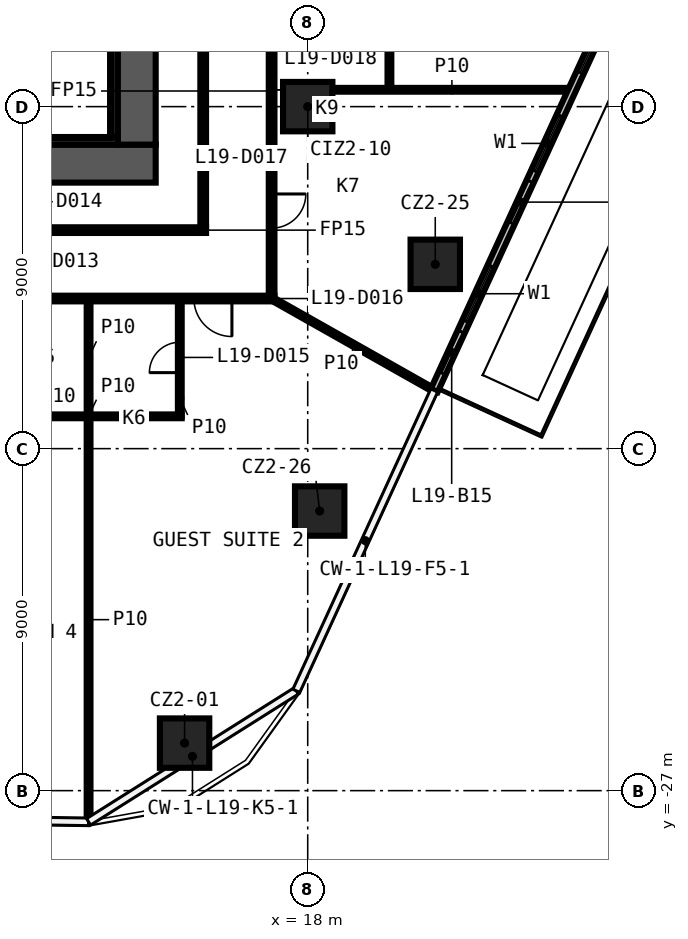
"""IFC4 building model, lengths in metres.
Left out: names, types, materials, properties, quantities, classifications, styles, units other than length and angle.
Written with IfcOpenShell. Run it as: python <this file> out.ifc"""

import sys

from ifc_helpers import new_model, si_unit, direction, frame, frame_2d, origin, origin_2d, place, context, subcontext, project, spatial, rectangle, extrude, element, fill, save


model = new_model("IFC4")
c1 = context("Model", 3, precision=1e-05, world=origin(), true_north=direction((0.0, 1.0)))
c2 = subcontext(c1, "Body", "Model", "MODEL_VIEW")
j1 = project(units=[si_unit("LENGTHUNIT", "METRE"), si_unit("PLANEANGLEUNIT", "RADIAN")], contexts=[c1])
p1 = place(None, origin())
s1 = spatial("IfcSite", under=j1, at=p1, CompositionType="ELEMENT")
p2 = place(p1, origin())
s2 = spatial("IfcBuilding", under=s1, at=p2, CompositionType="ELEMENT")
p3 = place(p2, frame((0.0, 0.0, 95.2)))
s3 = spatial("IfcBuildingStorey", under=s2, at=p3, CompositionType="ELEMENT", Elevation=95.2)
for number, where, z_axis, x_axis in (
    (1, (14.76, -25.749, 0.0), (0.0, 0.0, 1.0), (1.0, 0.0, 0.0)),
    (2, (21.356, -13.15, 0.0), (0.0, 0.0, 1.0), (1.0, 0.0, 0.0)),
    (3, (18.315, -19.642, 0.0), (0.0, 0.0, 1.0), (1.0, 0.0, 0.0)),
    (4, (18.0, -9.0, 0.0), (0.0, 0.0, 1.0), (1.0, 0.0, 0.0)),
):
    element("IfcColumn", number, at=place(p3, frame(where, z_axis=z_axis, x_axis=x_axis)), inside=s3, PredefinedType="COLUMN", context=c2, shape_type="SweptSolid", body=[
        extrude(rectangle(XDim=1.3, YDim=1.3, at=origin_2d()), origin(), (0.0, 0.0, 1.0), 3.25),
    ])
p4 = place(p3, frame((9.784, -17.15, 0.0), z_axis=(0.0, 0.0, 1.0), x_axis=(1.0, 0.0, 0.0)))
e5 = element("IfcWall", 5, at=p4, inside=s3, PredefinedType="PARTITIONING", context=c2, shape_type="SweptSolid", body=[
    extrude(rectangle(XDim=4.9, YDim=0.1, at=frame_2d((2.45, 0.0))), origin(), (0.0, 0.0, 1.0), 3.25),
])
p5 = place(p3, frame((17.125, -14.05, 0.0), z_axis=(0.0, 0.0, 1.0), x_axis=(-1.0, 0.0, 0.0)))
e6 = element("IfcWall", 6, at=p5, inside=s3, PredefinedType="PARTITIONING", context=c2, shape_type="SweptSolid", body=[
    extrude(rectangle(XDim=34.25, YDim=0.15, at=frame_2d((17.125, 0.0))), origin(), (0.0, 0.0, 1.0), 3.25),
])
p6 = place(p5, frame((32.158, 0.0, 0.0)))
e7 = element("IfcOpeningElement", 7, at=p6, cuts=e6, PredefinedType="OPENING", context=c2, shape_type="SweptSolid", body=[
    extrude(rectangle(XDim=0.9, YDim=2.1, at=frame_2d((0.45, 1.05))), frame((0.0, 0.085, 0.0), z_axis=(0.0, -1.0, 0.0), x_axis=(1.0, 0.0, 0.0)), (0.0, 0.0, 1.0), 0.17),
])
p7 = place(p5, frame((27.561, 0.0, 0.0)))
e8 = element("IfcOpeningElement", 8, at=p7, cuts=e6, PredefinedType="OPENING", context=c2, shape_type="SweptSolid", body=[
    extrude(rectangle(XDim=1.0, YDim=2.1, at=frame_2d((0.5, 1.05))), frame((0.0, 0.085, 0.0), z_axis=(0.0, -1.0, 0.0), x_axis=(1.0, 0.0, 0.0)), (0.0, 0.0, 1.0), 0.17),
])
p8 = place(p5, frame((18.64, 0.0, 0.0)))
e9 = element("IfcOpeningElement", 9, at=p8, cuts=e6, PredefinedType="OPENING", context=c2, shape_type="SweptSolid", body=[
    extrude(rectangle(XDim=1.0, YDim=2.1, at=frame_2d((0.5, 1.05))), frame((0.0, 0.085, 0.0), z_axis=(0.0, -1.0, 0.0), x_axis=(1.0, 0.0, 0.0)), (0.0, 0.0, 1.0), 0.17),
])
p9 = place(p5, frame((16.624, 0.0, 0.0)))
e10 = element("IfcOpeningElement", 10, at=p9, cuts=e6, PredefinedType="OPENING", context=c2, shape_type="SweptSolid", body=[
    extrude(rectangle(XDim=1.0, YDim=2.1, at=frame_2d((0.5, 1.05))), frame((0.0, 0.085, 0.0), z_axis=(0.0, -1.0, 0.0), x_axis=(1.0, 0.0, 0.0)), (0.0, 0.0, 1.0), 0.17),
])
p10 = place(p5, frame((9.807, 0.0, 0.0)))
e11 = element("IfcOpeningElement", 11, at=p10, cuts=e6, PredefinedType="OPENING", context=c2, shape_type="SweptSolid", body=[
    extrude(rectangle(XDim=1.0, YDim=2.1, at=frame_2d((0.5, 1.05))), frame((0.0, 0.085, 0.0), z_axis=(0.0, -1.0, 0.0), x_axis=(1.0, 0.0, 0.0)), (0.0, 0.0, 1.0), 0.17),
])
p11 = place(p5, frame((7.795, 0.0, 0.0)))
e12 = element("IfcOpeningElement", 12, at=p11, cuts=e6, PredefinedType="OPENING", context=c2, shape_type="SweptSolid", body=[
    extrude(rectangle(XDim=1.0, YDim=2.1, at=frame_2d((0.5, 1.05))), frame((0.0, 0.085, 0.0), z_axis=(0.0, -1.0, 0.0), x_axis=(1.0, 0.0, 0.0)), (0.0, 0.0, 1.0), 0.17),
])
p12 = place(p5, frame((1.119, 0.0, 0.0)))
e13 = element("IfcOpeningElement", 13, at=p12, cuts=e6, PredefinedType="OPENING", context=c2, shape_type="SweptSolid", body=[
    extrude(rectangle(XDim=1.0, YDim=2.1, at=frame_2d((0.5, 1.05))), frame((0.0, 0.085, 0.0), z_axis=(0.0, -1.0, 0.0), x_axis=(1.0, 0.0, 0.0)), (0.0, 0.0, 1.0), 0.17),
])
p13 = place(p3, frame((8.925, -12.25, 0.0), z_axis=(0.0, 0.0, 1.0), x_axis=(1.0, 0.0, 0.0)))
e14 = element("IfcWall", 14, at=p13, inside=s3, PredefinedType="PARTITIONING", context=c2, shape_type="SweptSolid", body=[
    extrude(rectangle(XDim=6.4, YDim=0.15, at=frame_2d((3.2, 0.0))), origin(), (0.0, 0.0, 1.0), 3.25),
])
p14 = place(p3, frame((18.65, -8.557, 0.0), z_axis=(0.0, 0.0, 1.0), x_axis=(1.0, 0.0, 0.0)))
e15 = element("IfcWall", 15, at=p14, inside=s3, PredefinedType="PARTITIONING", context=c2, shape_type="SweptSolid", body=[
    extrude(rectangle(XDim=6.288, YDim=0.1, at=frame_2d((3.144, 0.0))), origin(), (0.0, 0.0, 1.0), 3.25),
])
p15 = place(p3, frame((20.15, -8.507, 0.0), z_axis=(0.0, 0.0, 1.0), x_axis=(0.0, 1.0, 0.0)))
e16 = element("IfcWall", 16, at=p15, inside=s3, PredefinedType="PARTITIONING", context=c2, shape_type="SweptSolid", body=[
    extrude(rectangle(XDim=2.3, YDim=0.1, at=frame_2d((1.15, 0.0))), origin(), (0.0, 0.0, 1.0), 3.25),
])
p16 = place(p3, frame((17.05, 13.975, 0.0), z_axis=(0.0, 0.0, 1.0), x_axis=(0.0, -1.0, 0.0)))
e17 = element("IfcWall", 17, at=p16, inside=s3, PredefinedType="PARTITIONING", context=c2, shape_type="SweptSolid", body=[
    extrude(rectangle(XDim=27.95, YDim=0.15, at=frame_2d((13.975, 0.0))), origin(), (0.0, 0.0, 1.0), 3.25),
])
p17 = place(p16, frame((25.274, 0.0, 0.0)))
e18 = element("IfcOpeningElement", 18, at=p17, cuts=e17, PredefinedType="OPENING", context=c2, shape_type="SweptSolid", body=[
    extrude(rectangle(XDim=0.9, YDim=2.1, at=frame_2d((0.45, 1.05))), frame((0.0, 0.085, 0.0), z_axis=(0.0, -1.0, 0.0), x_axis=(1.0, 0.0, 0.0)), (0.0, 0.0, 1.0), 0.17),
])
p18 = place(p16, frame((18.854, 0.0, 0.0)))
e19 = element("IfcOpeningElement", 19, at=p18, cuts=e17, PredefinedType="OPENING", context=c2, shape_type="SweptSolid", body=[
    extrude(rectangle(XDim=1.0, YDim=2.1, at=frame_2d((0.5, 1.05))), frame((0.0, 0.085, 0.0), z_axis=(0.0, -1.0, 0.0), x_axis=(1.0, 0.0, 0.0)), (0.0, 0.0, 1.0), 0.17),
])
p19 = place(p16, frame((17.299, 0.0, 0.0)))
e20 = element("IfcOpeningElement", 20, at=p19, cuts=e17, PredefinedType="OPENING", context=c2, shape_type="SweptSolid", body=[
    extrude(rectangle(XDim=1.0, YDim=2.1, at=frame_2d((0.5, 1.05))), frame((0.0, 0.085, 0.0), z_axis=(0.0, -1.0, 0.0), x_axis=(1.0, 0.0, 0.0)), (0.0, 0.0, 1.0), 0.17),
])
p20 = place(p16, frame((11.171, 0.0, 0.0)))
e21 = element("IfcOpeningElement", 21, at=p20, cuts=e17, PredefinedType="OPENING", context=c2, shape_type="SweptSolid", body=[
    extrude(rectangle(XDim=0.9, YDim=2.1, at=frame_2d((0.45, 1.05))), frame((0.0, 0.085, 0.0), z_axis=(0.0, -1.0, 0.0), x_axis=(1.0, 0.0, 0.0)), (0.0, 0.0, 1.0), 0.17),
])
p21 = place(p16, frame((7.243, 0.0, 0.0)))
e22 = element("IfcOpeningElement", 22, at=p21, cuts=e17, PredefinedType="OPENING", context=c2, shape_type="SweptSolid", body=[
    extrude(rectangle(XDim=0.9, YDim=2.1, at=frame_2d((0.45, 1.05))), frame((0.0, 0.085, 0.0), z_axis=(0.0, -1.0, 0.0), x_axis=(1.0, 0.0, 0.0)), (0.0, 0.0, 1.0), 0.17),
])
p22 = place(p16, frame((2.153, 0.0, 0.0)))
e23 = element("IfcOpeningElement", 23, at=p22, cuts=e17, PredefinedType="OPENING", context=c2, shape_type="SweptSolid", body=[
    extrude(rectangle(XDim=0.9, YDim=2.1, at=frame_2d((0.45, 1.05))), frame((0.0, 0.085, 0.0), z_axis=(0.0, -1.0, 0.0), x_axis=(1.0, 0.0, 0.0)), (0.0, 0.0, 1.0), 0.17),
])
p23 = place(p3, frame((15.25, -12.175, 0.0), z_axis=(0.0, 0.0, 1.0), x_axis=(0.0, 1.0, 0.0)))
e24 = element("IfcWall", 24, at=p23, inside=s3, PredefinedType="PARTITIONING", context=c2, shape_type="SweptSolid", body=[
    extrude(rectangle(XDim=24.35, YDim=0.15, at=frame_2d((12.175, 0.0))), origin(), (0.0, 0.0, 1.0), 3.25),
])
p24 = place(p23, frame((11.725, 0.0, 0.0)))
e25 = element("IfcOpeningElement", 25, at=p24, cuts=e24, PredefinedType="OPENING", context=c2, shape_type="SweptSolid", body=[
    extrude(rectangle(XDim=0.9, YDim=2.1, at=frame_2d((0.45, 1.05))), frame((0.0, 0.085, 0.0), z_axis=(0.0, -1.0, 0.0), x_axis=(1.0, 0.0, 0.0)), (0.0, 0.0, 1.0), 0.17),
])
p25 = place(p3, frame((14.634, -17.15, 0.0), z_axis=(0.0, 0.0, 1.0), x_axis=(0.0, 1.0, 0.0)))
e26 = element("IfcWall", 26, at=p25, inside=s3, PredefinedType="PARTITIONING", context=c2, shape_type="SweptSolid", body=[
    extrude(rectangle(XDim=3.025, YDim=0.1, at=frame_2d((1.512, 0.0))), origin(), (0.0, 0.0, 1.0), 3.25),
])
p26 = place(p25, frame((1.15, 0.0, 0.0)))
e27 = element("IfcOpeningElement", 27, at=p26, cuts=e26, PredefinedType="OPENING", context=c2, shape_type="SweptSolid", body=[
    extrude(rectangle(XDim=0.8, YDim=2.1, at=frame_2d((0.4, 1.05))), frame((0.0, 0.06, 0.0), z_axis=(0.0, -1.0, 0.0), x_axis=(1.0, 0.0, 0.0)), (0.0, 0.0, 1.0), 0.12),
])
p27 = place(p3, frame((12.234, -27.801, 0.0), z_axis=(0.0, 0.0, 1.0), x_axis=(0.0, 1.0, 0.0)))
e28 = element("IfcWall", 28, at=p27, inside=s3, PredefinedType="PARTITIONING", context=c2, shape_type="SweptSolid", body=[
    extrude(rectangle(XDim=10.601, YDim=0.1, at=frame_2d((5.3, 0.0))), origin(), (0.0, 0.0, 1.0), 3.25),
])
p28 = place(p3, frame((12.234, -17.1, 0.0), z_axis=(0.0, 0.0, 1.0), x_axis=(0.0, 1.0, 0.0)))
e29 = element("IfcWall", 29, at=p28, inside=s3, PredefinedType="PARTITIONING", context=c2, shape_type="SweptSolid", body=[
    extrude(rectangle(XDim=2.975, YDim=0.1, at=frame_2d((1.488, 0.0))), origin(), (0.0, 0.0, 1.0), 3.25),
])
p29 = place(p3, frame((17.05, -14.05, 0.0), z_axis=(0.0, 0.0, 1.0), x_axis=(0.87059349, -0.492003023537, 0.0)))
e30 = element("IfcWall", 30, at=p29, inside=s3, PredefinedType="PARTITIONING", context=c2, shape_type="SweptSolid", body=[
    extrude(rectangle(XDim=4.895, YDim=0.1, at=frame_2d((2.448, 0.0))), origin(), (0.0, 0.0, 1.0), 3.25),
])
p30 = place(p3, frame((21.329, -16.468, 0.0), z_axis=(0.0, 0.0, 1.0), x_axis=(0.417117833448, 0.908852415423, 0.0)))
e31 = element("IfcWall", 31, at=p30, inside=s3, PredefinedType="SOLIDWALL", context=c2, shape_type="SweptSolid", body=[
    extrude(rectangle(XDim=21.761, YDim=0.2, at=frame_2d((10.881, 0.0))), origin(), (0.0, 0.0, 1.0), 3.25),
])
p31 = place(p30, frame((2.0, 0.0, 0.6)))
e32 = element("IfcOpeningElement", 32, at=p31, cuts=e31, PredefinedType="OPENING", context=c2, shape_type="SweptSolid", body=[
    extrude(rectangle(XDim=1.6, YDim=2.4, at=frame_2d((0.8, 1.2))), frame((0.0, 0.11, 0.0), z_axis=(0.0, -1.0, 0.0), x_axis=(1.0, 0.0, 0.0)), (0.0, 0.0, 1.0), 0.22),
])
p32 = place(p30, frame((0.5, 0.0, 0.0)))
e33 = element("IfcOpeningElement", 33, at=p32, cuts=e31, PredefinedType="OPENING", context=c2, shape_type="SweptSolid", body=[
    extrude(rectangle(XDim=1.2, YDim=2.4, at=frame_2d((0.6, 1.2))), frame((0.0, 0.11, 0.0), z_axis=(0.0, -1.0, 0.0), x_axis=(1.0, 0.0, 0.0)), (0.0, 0.0, 1.0), 0.22),
])
p33 = place(p30, frame((6.352, 0.0, 0.6)))
e34 = element("IfcOpeningElement", 34, at=p33, cuts=e31, PredefinedType="OPENING", context=c2, shape_type="SweptSolid", body=[
    extrude(rectangle(XDim=1.6, YDim=2.4, at=frame_2d((0.8, 1.2))), frame((0.0, 0.11, 0.0), z_axis=(0.0, -1.0, 0.0), x_axis=(1.0, 0.0, 0.0)), (0.0, 0.0, 1.0), 0.22),
])
p34 = place(p30, frame((4.852, 0.0, 0.0)))
e35 = element("IfcOpeningElement", 35, at=p34, cuts=e31, PredefinedType="OPENING", context=c2, shape_type="SweptSolid", body=[
    extrude(rectangle(XDim=1.2, YDim=2.4, at=frame_2d((0.6, 1.2))), frame((0.0, 0.11, 0.0), z_axis=(0.0, -1.0, 0.0), x_axis=(1.0, 0.0, 0.0)), (0.0, 0.0, 1.0), 0.22),
])
p35 = place(p30, frame((9.205, 0.0, 0.6)))
e36 = element("IfcOpeningElement", 36, at=p35, cuts=e31, PredefinedType="OPENING", context=c2, shape_type="SweptSolid", body=[
    extrude(rectangle(XDim=1.6, YDim=2.4, at=frame_2d((0.8, 1.2))), frame((0.0, 0.11, 0.0), z_axis=(0.0, -1.0, 0.0), x_axis=(1.0, 0.0, 0.0)), (0.0, 0.0, 1.0), 0.22),
])
p36 = place(p30, frame((11.205, 0.0, 0.0)))
e37 = element("IfcOpeningElement", 37, at=p36, cuts=e31, PredefinedType="OPENING", context=c2, shape_type="SweptSolid", body=[
    extrude(rectangle(XDim=1.2, YDim=2.4, at=frame_2d((0.6, 1.2))), frame((0.0, 0.11, 0.0), z_axis=(0.0, -1.0, 0.0), x_axis=(1.0, 0.0, 0.0)), (0.0, 0.0, 1.0), 0.22),
])
p37 = place(p30, frame((15.057, 0.0, 0.6)))
e38 = element("IfcOpeningElement", 38, at=p37, cuts=e31, PredefinedType="OPENING", context=c2, shape_type="SweptSolid", body=[
    extrude(rectangle(XDim=1.6, YDim=2.4, at=frame_2d((0.8, 1.2))), frame((0.0, 0.11, 0.0), z_axis=(0.0, -1.0, 0.0), x_axis=(1.0, 0.0, 0.0)), (0.0, 0.0, 1.0), 0.22),
])
p38 = place(p30, frame((13.557, 0.0, 0.0)))
e39 = element("IfcOpeningElement", 39, at=p38, cuts=e31, PredefinedType="OPENING", context=c2, shape_type="SweptSolid", body=[
    extrude(rectangle(XDim=1.2, YDim=2.4, at=frame_2d((0.6, 1.2))), frame((0.0, 0.11, 0.0), z_axis=(0.0, -1.0, 0.0), x_axis=(1.0, 0.0, 0.0)), (0.0, 0.0, 1.0), 0.22),
])
p39 = place(p30, frame((19.909, 0.0, 0.6)))
e40 = element("IfcOpeningElement", 40, at=p39, cuts=e31, PredefinedType="OPENING", context=c2, shape_type="SweptSolid", body=[
    extrude(rectangle(XDim=1.6, YDim=2.4, at=frame_2d((0.8, 1.2))), frame((0.0, 0.11, 0.0), z_axis=(0.0, -1.0, 0.0), x_axis=(1.0, 0.0, 0.0)), (0.0, 0.0, 1.0), 0.22),
])
p40 = place(p30, frame((18.409, 0.0, 0.0)))
e41 = element("IfcOpeningElement", 41, at=p40, cuts=e31, PredefinedType="OPENING", context=c2, shape_type="SweptSolid", body=[
    extrude(rectangle(XDim=1.2, YDim=2.4, at=frame_2d((0.6, 1.2))), frame((0.0, 0.11, 0.0), z_axis=(0.0, -1.0, 0.0), x_axis=(1.0, 0.0, 0.0)), (0.0, 0.0, 1.0), 0.22),
])
p41 = place(p3, frame((14.0, -10.5, 0.0), z_axis=(0.0, 0.0, 1.0), x_axis=(-1.0, 0.0, 0.0)))
e42 = element("IfcWall", 42, at=p41, inside=s3, PredefinedType="SHEAR", context=c2, shape_type="SweptSolid", body=[
    extrude(rectangle(XDim=28.0, YDim=1.0, at=frame_2d((14.0, 0.0))), origin(), (0.0, 0.0, 1.0), 3.25),
])
p42 = place(p41, frame((5.1, 0.0, 0.0)))
e43 = element("IfcOpeningElement", 43, at=p42, cuts=e42, PredefinedType="OPENING", context=c2, shape_type="SweptSolid", body=[
    extrude(rectangle(XDim=1.6, YDim=2.1, at=frame_2d((0.8, 1.05))), frame((0.0, 0.51, 0.0), z_axis=(0.0, -1.0, 0.0), x_axis=(1.0, 0.0, 0.0)), (0.0, 0.0, 1.0), 1.02),
])
p43 = place(p3, frame((13.5, 10.0, 0.0), z_axis=(0.0, 0.0, 1.0), x_axis=(0.0, -1.0, 0.0)))
e44 = element("IfcWall", 44, at=p43, inside=s3, PredefinedType="SHEAR", context=c2, shape_type="SweptSolid", body=[
    extrude(rectangle(XDim=20.0, YDim=1.0, at=frame_2d((10.0, 0.0))), origin(), (0.0, 0.0, 1.0), 3.25),
])
p44 = place(p3, frame((13.0, -9.9, 0.0), z_axis=(0.0, 0.0, 1.0), x_axis=(-1.0, 0.0, 0.0)))
e45 = element("IfcWall", 45, at=p44, inside=s3, PredefinedType="SHEAR", context=c2, shape_type="SweptSolid", body=[
    extrude(rectangle(XDim=3.7, YDim=0.2, at=frame_2d((1.85, 0.0))), origin(), (0.0, 0.0, 1.0), 3.25),
])
p45 = place(p3, frame((12.9, 9.8, 0.0), z_axis=(0.0, 0.0, 1.0), x_axis=(0.0, -1.0, 0.0)))
e46 = element("IfcWall", 46, at=p45, inside=s3, PredefinedType="SHEAR", context=c2, shape_type="SweptSolid", body=[
    extrude(rectangle(XDim=19.6, YDim=0.2, at=frame_2d((9.8, 0.0))), origin(), (0.0, 0.0, 1.0), 3.25),
])
p46 = place(p26, origin())
e47 = element("IfcDoor", 47, at=p46, inside=s3, OperationType="SINGLE_SWING_LEFT", PredefinedType="DOOR", context=c2, shape_type="SweptSolid", body=[
    extrude(rectangle(XDim=0.8, YDim=2.1, at=frame_2d((0.4, 1.05))), frame((0.0, 0.025, 0.0), z_axis=(0.0, -1.0, 0.0), x_axis=(1.0, 0.0, 0.0)), (0.0, 0.0, 1.0), 0.05),
])
fill(e27, e47)
p47 = place(p12, origin())
e48 = element("IfcDoor", 48, at=p47, inside=s3, OperationType="SINGLE_SWING_RIGHT", PredefinedType="DOOR", context=c2, shape_type="SweptSolid", body=[
    extrude(rectangle(XDim=1.0, YDim=2.1, at=frame_2d((0.5, 1.05))), frame((0.0, 0.025, 0.0), z_axis=(0.0, -1.0, 0.0), x_axis=(1.0, 0.0, 0.0)), (0.0, 0.0, 1.0), 0.05),
])
fill(e13, e48)
p48 = place(p17, origin())
e49 = element("IfcDoor", 49, at=p48, inside=s3, OperationType="SINGLE_SWING_LEFT", PredefinedType="DOOR", context=c2, shape_type="SweptSolid", body=[
    extrude(rectangle(XDim=0.9, YDim=2.1, at=frame_2d((0.45, 1.05))), frame((0.0, 0.025, 0.0), z_axis=(0.0, -1.0, 0.0), x_axis=(1.0, 0.0, 0.0)), (0.0, 0.0, 1.0), 0.05),
])
fill(e18, e49)
p49 = place(p31, origin())
e50 = element("IfcWindow", 50, at=p49, inside=s3, PartitioningType="SINGLE_PANEL", PredefinedType="WINDOW", context=c2, shape_type="SweptSolid", body=[
    extrude(rectangle(XDim=1.6, YDim=2.4, at=frame_2d((0.8, 1.2))), frame((0.0, 0.03, 0.0), z_axis=(0.0, -1.0, 0.0), x_axis=(1.0, 0.0, 0.0)), (0.0, 0.0, 1.0), 0.06),
])
fill(e32, e50)
p50 = place(p32, origin())
e51 = element("IfcDoor", 51, at=p50, inside=s3, OperationType="SLIDING_TO_LEFT", PredefinedType="DOOR", context=c2, shape_type="SweptSolid", body=[
    extrude(rectangle(XDim=1.2, YDim=2.4, at=frame_2d((0.6, 1.2))), frame((0.0, 0.025, 0.0), z_axis=(0.0, -1.0, 0.0), x_axis=(1.0, 0.0, 0.0)), (0.0, 0.0, 1.0), 0.05),
])
fill(e33, e51)
p51 = place(p33, origin())
e52 = element("IfcWindow", 52, at=p51, inside=s3, PartitioningType="SINGLE_PANEL", PredefinedType="WINDOW", context=c2, shape_type="SweptSolid", body=[
    extrude(rectangle(XDim=1.6, YDim=2.4, at=frame_2d((0.8, 1.2))), frame((0.0, 0.03, 0.0), z_axis=(0.0, -1.0, 0.0), x_axis=(1.0, 0.0, 0.0)), (0.0, 0.0, 1.0), 0.06),
])
fill(e34, e52)
p52 = place(p34, origin())
e53 = element("IfcDoor", 53, at=p52, inside=s3, OperationType="SLIDING_TO_LEFT", PredefinedType="DOOR", context=c2, shape_type="SweptSolid", body=[
    extrude(rectangle(XDim=1.2, YDim=2.4, at=frame_2d((0.6, 1.2))), frame((0.0, 0.025, 0.0), z_axis=(0.0, -1.0, 0.0), x_axis=(1.0, 0.0, 0.0)), (0.0, 0.0, 1.0), 0.05),
])
fill(e35, e53)
p53 = place(p35, origin())
e54 = element("IfcWindow", 54, at=p53, inside=s3, PartitioningType="SINGLE_PANEL", PredefinedType="WINDOW", context=c2, shape_type="SweptSolid", body=[
    extrude(rectangle(XDim=1.6, YDim=2.4, at=frame_2d((0.8, 1.2))), frame((0.0, 0.03, 0.0), z_axis=(0.0, -1.0, 0.0), x_axis=(1.0, 0.0, 0.0)), (0.0, 0.0, 1.0), 0.06),
])
fill(e36, e54)
save(model, sys.argv[1])
